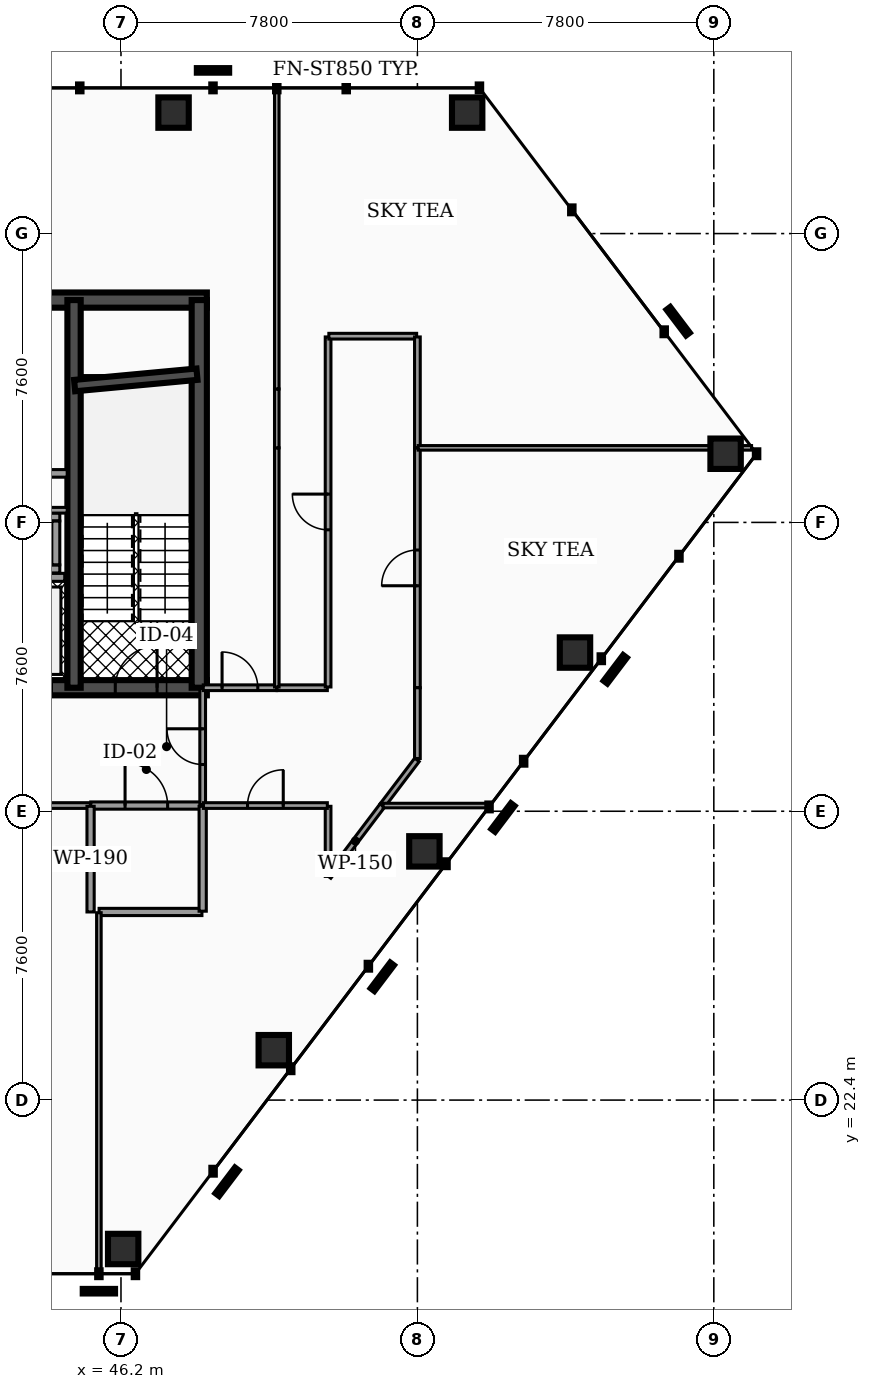
"""IFC4 building model, lengths in metres.
Left out: names, types, materials, properties, quantities, classifications, styles, units other than length and angle.
Written with IfcOpenShell. Run it as: python <this file> out.ifc"""

import sys

from ifc_helpers import new_model, si_unit, direction, frame, frame_2d, origin, origin_2d, place, context, subcontext, project, spatial, rectangle, hollow_rectangle, extrude, element, fill, save


model = new_model("IFC4")
c1 = context("Model", 3, precision=1e-05, world=origin(), true_north=direction((0.0, 1.0)))
c2 = subcontext(c1, "Body", "Model", "MODEL_VIEW")
j1 = project(units=[si_unit("LENGTHUNIT", "METRE"), si_unit("PLANEANGLEUNIT", "RADIAN")], contexts=[c1])
p1 = place(None, origin())
s1 = spatial("IfcSite", under=j1, at=p1, CompositionType="ELEMENT")
p2 = place(p1, origin())
s2 = spatial("IfcBuilding", under=s1, at=p2, CompositionType="ELEMENT")
p3 = place(p2, frame((0.0, 0.0, 145.86)))
s3 = spatial("IfcBuildingStorey", under=s2, at=p3, CompositionType="ELEMENT", Elevation=145.86)
p4 = place(p3, frame((28.4, 43.45, 0.0), z_axis=(0.0, 0.0, 1.0), x_axis=(1.0, 0.0, 0.0)))
e1 = element("IfcWall", 1, at=p4, inside=s3, PredefinedType="SHEAR", context=c2, shape_type="SweptSolid", body=[
    extrude(rectangle(XDim=20.06, YDim=0.4, at=frame_2d((10.03, 0.0))), origin(), (0.0, 0.0, 1.0), 3.5),
])
p5 = place(p3, frame((28.4, 33.25, 0.0), z_axis=(0.0, 0.0, 1.0), x_axis=(1.0, 0.0, 0.0)))
e2 = element("IfcWall", 2, at=p5, inside=s3, PredefinedType="SHEAR", context=c2, shape_type="SweptSolid", body=[
    extrude(rectangle(XDim=20.06, YDim=0.4, at=frame_2d((10.03, 0.0))), origin(), (0.0, 0.0, 1.0), 3.5),
])
p6 = place(p5, frame((4.03, 0.0, 0.0)))
e3 = element("IfcOpeningElement", 3, at=p6, cuts=e2, PredefinedType="OPENING", context=c2, shape_type="SweptSolid", body=[
    extrude(rectangle(XDim=1.1, YDim=2.15, at=frame_2d((0.55, 1.075))), frame((0.0, 0.21, 0.0), z_axis=(0.0, -1.0, 0.0), x_axis=(1.0, 0.0, 0.0)), (0.0, 0.0, 1.0), 0.42),
])
p7 = place(p5, frame((14.87, 0.0, 0.0)))
e4 = element("IfcOpeningElement", 4, at=p7, cuts=e2, PredefinedType="OPENING", context=c2, shape_type="SweptSolid", body=[
    extrude(rectangle(XDim=1.1, YDim=2.15, at=frame_2d((0.55, 1.075))), frame((0.0, 0.21, 0.0), z_axis=(0.0, -1.0, 0.0), x_axis=(1.0, 0.0, 0.0)), (0.0, 0.0, 1.0), 0.42),
])
p8 = place(p5, frame((5.95, 0.0, 0.0)))
e5 = element("IfcOpeningElement", 5, at=p8, cuts=e2, PredefinedType="OPENING", context=c2, shape_type="SweptSolid", body=[
    extrude(rectangle(XDim=1.0, YDim=2.1, at=frame_2d((0.5, 1.05))), frame((0.0, 0.21, 0.0), z_axis=(0.0, -1.0, 0.0), x_axis=(1.0, 0.0, 0.0)), (0.0, 0.0, 1.0), 0.42),
])
p9 = place(p5, frame((7.65, 0.0, 0.0)))
e6 = element("IfcOpeningElement", 6, at=p9, cuts=e2, PredefinedType="OPENING", context=c2, shape_type="SweptSolid", body=[
    extrude(rectangle(XDim=1.0, YDim=2.1, at=frame_2d((0.5, 1.05))), frame((0.0, 0.21, 0.0), z_axis=(0.0, -1.0, 0.0), x_axis=(1.0, 0.0, 0.0)), (0.0, 0.0, 1.0), 0.42),
])
p10 = place(p5, frame((1.31, 0.0, 0.0)))
e7 = element("IfcOpeningElement", 7, at=p10, cuts=e2, PredefinedType="OPENING", context=c2, shape_type="SweptSolid", body=[
    extrude(rectangle(XDim=1.1, YDim=2.2, at=frame_2d((0.55, 1.1))), frame((0.0, 0.21, 0.0), z_axis=(0.0, -1.0, 0.0), x_axis=(1.0, 0.0, 0.0)), (0.0, 0.0, 1.0), 0.42),
])
p11 = place(p5, frame((9.44, 0.0, 0.0)))
e8 = element("IfcOpeningElement", 8, at=p11, cuts=e2, PredefinedType="OPENING", context=c2, shape_type="SweptSolid", body=[
    extrude(rectangle(XDim=1.12, YDim=2.05, at=frame_2d((0.56, 1.025))), frame((0.0, 0.21, 0.0), z_axis=(0.0, -1.0, 0.0), x_axis=(1.0, 0.0, 0.0)), (0.0, 0.0, 1.0), 0.42),
])
p12 = place(p5, frame((17.65, 0.0, 0.0)))
e9 = element("IfcOpeningElement", 9, at=p12, cuts=e2, PredefinedType="OPENING", context=c2, shape_type="SweptSolid", body=[
    extrude(rectangle(XDim=1.1, YDim=2.2, at=frame_2d((0.55, 1.1))), frame((0.0, 0.21, 0.0), z_axis=(0.0, -1.0, 0.0), x_axis=(1.0, 0.0, 0.0)), (0.0, 0.0, 1.0), 0.42),
])
p13 = place(p3, frame((44.965, 33.25, 0.0), z_axis=(0.0, 0.0, 1.0), x_axis=(0.0, 1.0, 0.0)))
e10 = element("IfcWall", 10, at=p13, inside=s3, PredefinedType="SHEAR", context=c2, shape_type="SweptSolid", body=[
    extrude(rectangle(XDim=10.2, YDim=0.35, at=frame_2d((5.1, 0.0))), origin(), (0.0, 0.0, 1.0), 3.5),
])
p14 = place(p3, frame((48.26, 33.25, 0.0), z_axis=(0.0, 0.0, 1.0), x_axis=(0.0, 1.0, 0.0)))
e11 = element("IfcWall", 11, at=p14, inside=s3, PredefinedType="SHEAR", context=c2, shape_type="SweptSolid", body=[
    extrude(rectangle(XDim=10.2, YDim=0.4, at=frame_2d((5.1, 0.0))), origin(), (0.0, 0.0, 1.0), 3.5),
])
p15 = place(p3, frame((44.98, 41.2, 0.0), z_axis=(0.0, 0.0, 1.0), x_axis=(0.995686468965, 0.09278176286, 0.0)))
e12 = element("IfcWall", 12, at=p15, inside=s3, PredefinedType="SHEAR", context=c2, shape_type="SweptSolid", body=[
    extrude(rectangle(XDim=3.234, YDim=0.3, at=frame_2d((1.617, 0.0))), origin(), (0.0, 0.0, 1.0), 3.5),
])
for number, where, z_axis, x_axis in (
    (13, (55.31, 48.383, 0.0), (0.0, 0.0, 1.0), (1.0, 0.0, 0.0)),
    (14, (47.583, 48.383, 0.0), (0.0, 0.0, 1.0), (1.0, 0.0, 0.0)),
    (15, (46.258, 18.481, 0.0), (0.0, 0.0, 1.0), (1.0, 0.0, 0.0)),
    (16, (50.221, 23.713, 0.0), (0.0, 0.0, 1.0), (1.0, 0.0, 0.0)),
    (17, (54.184, 28.944, 0.0), (0.0, 0.0, 1.0), (1.0, 0.0, 0.0)),
    (18, (58.147, 34.176, 0.0), (0.0, 0.0, 1.0), (1.0, 0.0, 0.0)),
    (19, (62.11, 39.407, 0.0), (0.0, 0.0, 1.0), (1.0, 0.0, 0.0)),
):
    element("IfcColumn", number, at=place(p3, frame(where, z_axis=z_axis, x_axis=x_axis)), inside=s3, PredefinedType="COLUMN", context=c2, shape_type="SweptSolid", body=[
        extrude(hollow_rectangle(XDim=0.8, YDim=0.8, WallThickness=0.04, at=origin_2d()), origin(), (0.0, 0.0, 1.0), 3.5),
    ])
p16 = place(p3, frame((42.92, 36.155, 0.0), z_axis=(0.0, 0.0, 1.0), x_axis=(1.0, 0.0, 0.0)))
e20 = element("IfcWall", 20, at=p16, inside=s3, PredefinedType="SOLIDWALL", context=c2, shape_type="SweptSolid", body=[
    extrude(rectangle(XDim=1.8, YDim=0.21, at=frame_2d((0.9, 0.0))), origin(), (0.0, 0.0, 1.0), 2.472),
])
for number, where, z_axis, x_axis in (
    (21, (42.99, 36.375, 0.0), (0.0, 0.0, 1.0), (1.0, 0.0, 0.0)),
    (22, (42.99, 37.745, 0.0), (0.0, 0.0, 1.0), (1.0, 0.0, 0.0)),
):
    element("IfcWall", number, at=place(p3, frame(where, z_axis=z_axis, x_axis=x_axis)), inside=s3, PredefinedType="SOLIDWALL", context=c2, shape_type="SweptSolid", body=[
        extrude(rectangle(XDim=1.6, YDim=0.21, at=frame_2d((0.8, 0.0))), origin(), (0.0, 0.0, 1.0), 3.5),
    ])
p17 = place(p3, frame((44.485, 36.485, 0.0), z_axis=(0.0, 0.0, 1.0), x_axis=(0.0, 1.0, 0.0)))
e23 = element("IfcWall", 23, at=p17, inside=s3, PredefinedType="SOLIDWALL", context=c2, shape_type="SweptSolid", body=[
    extrude(rectangle(XDim=1.15, YDim=0.21, at=frame_2d((0.575, 0.0))), origin(), (0.0, 0.0, 1.0), 3.5),
])
p18 = place(p3, frame((39.25, 38.89, 0.0), z_axis=(0.0, 0.0, 1.0), x_axis=(1.0, 0.0, 0.0)))
e24 = element("IfcWall", 24, at=p18, inside=s3, PredefinedType="PARTITIONING", context=c2, shape_type="SweptSolid", body=[
    extrude(rectangle(XDim=5.535, YDim=0.2, at=frame_2d((2.768, 0.0))), origin(), (0.0, 0.0, 1.0), 2.457),
])
p19 = place(p18, frame((2.327, 0.0, 0.0)))
e25 = element("IfcOpeningElement", 25, at=p19, cuts=e24, PredefinedType="OPENING", context=c2, shape_type="SweptSolid", body=[
    extrude(rectangle(XDim=0.88, YDim=2.05, at=frame_2d((0.44, 1.025))), frame((0.0, 0.11, 0.0), z_axis=(0.0, -1.0, 0.0), x_axis=(1.0, 0.0, 0.0)), (0.0, 0.0, 1.0), 0.22),
])
p20 = place(p3, frame((41.62, 37.92, 0.0), z_axis=(0.0, 0.0, 1.0), x_axis=(1.0, 0.0, 0.0)))
e26 = element("IfcWall", 26, at=p20, inside=s3, PredefinedType="PARTITIONING", context=c2, shape_type="SweptSolid", body=[
    extrude(rectangle(XDim=3.165, YDim=0.15, at=frame_2d((1.583, 0.0))), origin(), (0.0, 0.0, 1.0), 2.457),
])
p21 = place(p20, frame((0.312, 0.0, 0.0)))
e27 = element("IfcOpeningElement", 27, at=p21, cuts=e26, PredefinedType="OPENING", context=c2, shape_type="SweptSolid", body=[
    extrude(rectangle(XDim=0.94, YDim=2.05, at=frame_2d((0.47, 1.025))), frame((0.0, 0.085, 0.0), z_axis=(0.0, -1.0, 0.0), x_axis=(1.0, 0.0, 0.0)), (0.0, 0.0, 1.0), 0.17),
])
p22 = place(p3, frame((45.405, 30.15, 0.0), z_axis=(0.0, 0.0, 1.0), x_axis=(1.0, 0.0, 0.0)))
e28 = element("IfcWall", 28, at=p22, inside=s3, PredefinedType="PARTITIONING", context=c2, shape_type="SweptSolid", body=[
    extrude(rectangle(XDim=2.925, YDim=0.19, at=frame_2d((1.462, 0.0))), origin(), (0.0, 0.0, 1.0), 2.457),
])
p23 = place(p22, frame((0.903, 0.0, 0.0)))
e29 = element("IfcOpeningElement", 29, at=p23, cuts=e28, PredefinedType="OPENING", context=c2, shape_type="SweptSolid", body=[
    extrude(rectangle(XDim=1.12, YDim=2.05, at=frame_2d((0.56, 1.025))), frame((0.0, 0.105, 0.0), z_axis=(0.0, -1.0, 0.0), x_axis=(1.0, 0.0, 0.0)), (0.0, 0.0, 1.0), 0.21),
])
p24 = place(p3, frame((48.35, 30.17, 0.0), z_axis=(0.0, 0.0, 1.0), x_axis=(0.0, 1.0, 0.0)))
e30 = element("IfcWall", 30, at=p24, inside=s3, PredefinedType="PARTITIONING", context=c2, shape_type="SweptSolid", body=[
    extrude(rectangle(XDim=3.06, YDim=0.15, at=frame_2d((1.53, 0.0))), origin(), (0.0, 0.0, 1.0), 2.457),
])
p25 = place(p24, frame((1.06, 0.0, 0.0)))
e31 = element("IfcOpeningElement", 31, at=p25, cuts=e30, PredefinedType="OPENING", context=c2, shape_type="SweptSolid", body=[
    extrude(rectangle(XDim=0.94, YDim=2.05, at=frame_2d((0.47, 1.025))), frame((0.0, 0.085, 0.0), z_axis=(0.0, -1.0, 0.0), x_axis=(1.0, 0.0, 0.0)), (0.0, 0.0, 1.0), 0.17),
])
p26 = place(p3, frame((35.385, 30.15, 0.0), z_axis=(0.0, 0.0, 1.0), x_axis=(1.0, 0.0, 0.0)))
e32 = element("IfcWall", 32, at=p26, inside=s3, PredefinedType="PARTITIONING", context=c2, shape_type="SweptSolid", body=[
    extrude(rectangle(XDim=10.01, YDim=0.15, at=frame_2d((5.005, 0.0))), origin(), (0.0, 0.0, 1.0), 2.457),
])
p27 = place(p26, frame((7.935, 0.0, 0.0)))
e33 = element("IfcOpeningElement", 33, at=p27, cuts=e32, PredefinedType="OPENING", context=c2, shape_type="SweptSolid", body=[
    extrude(rectangle(XDim=0.94, YDim=2.05, at=frame_2d((0.47, 1.025))), frame((0.0, 0.085, 0.0), z_axis=(0.0, -1.0, 0.0), x_axis=(1.0, 0.0, 0.0)), (0.0, 0.0, 1.0), 0.17),
])
p28 = place(p3, frame((45.4, 27.35, 0.0), z_axis=(0.0, 0.0, 1.0), x_axis=(0.0, 1.0, 0.0)))
e34 = element("IfcWall", 34, at=p28, inside=s3, PredefinedType="PARTITIONING", context=c2, shape_type="SweptSolid", body=[
    extrude(rectangle(XDim=2.78, YDim=0.19, at=frame_2d((1.39, 0.0))), origin(), (0.0, 0.0, 1.0), 2.457),
])
p29 = place(p3, frame((45.624, 27.35, 0.0), z_axis=(0.0, 0.0, 1.0), x_axis=(1.0, 0.0, 0.0)))
e35 = element("IfcWall", 35, at=p29, inside=s3, PredefinedType="PARTITIONING", context=c2, shape_type="SweptSolid", body=[
    extrude(rectangle(XDim=2.706, YDim=0.19, at=frame_2d((1.353, 0.0))), origin(), (0.0, 0.0, 1.0), 2.457),
])
p30 = place(p3, frame((48.35, 27.37, 0.0), z_axis=(0.0, 0.0, 1.0), x_axis=(0.0, 1.0, 0.0)))
e36 = element("IfcWall", 36, at=p30, inside=s3, PredefinedType="PARTITIONING", context=c2, shape_type="SweptSolid", body=[
    extrude(rectangle(XDim=2.76, YDim=0.19, at=frame_2d((1.38, 0.0))), origin(), (0.0, 0.0, 1.0), 2.457),
])
p31 = place(p3, frame((51.662, 28.282, 0.0), z_axis=(0.0, 0.0, 1.0), x_axis=(0.603811538878, 0.797127107504, 0.0)))
e37 = element("IfcWall", 37, at=p31, inside=s3, PredefinedType="PARTITIONING", context=c2, shape_type="SweptSolid", body=[
    extrude(rectangle(XDim=2.343, YDim=0.15, at=frame_2d((1.171, 0.0))), origin(), (0.0, 0.0, 1.0), 2.457),
])
p32 = place(p3, frame((51.65, 28.286, 0.0), z_axis=(0.0, 0.0, 1.0), x_axis=(0.0, 1.0, 0.0)))
e38 = element("IfcWall", 38, at=p32, inside=s3, PredefinedType="PARTITIONING", context=c2, shape_type="SweptSolid", body=[
    extrude(rectangle(XDim=1.844, YDim=0.15, at=frame_2d((0.922, 0.0))), origin(), (0.0, 0.0, 1.0), 2.457),
])
p33 = place(p3, frame((48.37, 30.15, 0.0), z_axis=(0.0, 0.0, 1.0), x_axis=(1.0, 0.0, 0.0)))
e39 = element("IfcWall", 39, at=p33, inside=s3, PredefinedType="PARTITIONING", context=c2, shape_type="SweptSolid", body=[
    extrude(rectangle(XDim=3.26, YDim=0.15, at=frame_2d((1.63, 0.0))), origin(), (0.0, 0.0, 1.0), 2.457),
])
p34 = place(p33, frame((1.16, 0.0, 0.0)))
e40 = element("IfcOpeningElement", 40, at=p34, cuts=e39, PredefinedType="OPENING", context=c2, shape_type="SweptSolid", body=[
    extrude(rectangle(XDim=0.94, YDim=2.05, at=frame_2d((0.47, 1.025))), frame((0.0, 0.085, 0.0), z_axis=(0.0, -1.0, 0.0), x_axis=(1.0, 0.0, 0.0)), (0.0, 0.0, 1.0), 0.17),
])
p35 = place(p3, frame((54.0, 33.25, 0.0), z_axis=(0.0, 0.0, 1.0), x_axis=(0.0, 1.0, 0.0)))
e41 = element("IfcWall", 41, at=p35, inside=s3, PredefinedType="PARTITIONING", context=c2, shape_type="SweptSolid", body=[
    extrude(rectangle(XDim=6.307, YDim=0.15, at=frame_2d((3.153, 0.0))), origin(), (0.0, 0.0, 1.0), 2.457),
])
p36 = place(p35, frame((2.683, 0.0, 0.0)))
e42 = element("IfcOpeningElement", 42, at=p36, cuts=e41, PredefinedType="OPENING", context=c2, shape_type="SweptSolid", body=[
    extrude(rectangle(XDim=0.94, YDim=2.05, at=frame_2d((0.47, 1.025))), frame((0.0, 0.085, 0.0), z_axis=(0.0, -1.0, 0.0), x_axis=(1.0, 0.0, 0.0)), (0.0, 0.0, 1.0), 0.17),
])
p37 = place(p3, frame((54.0, 31.388, 0.0), z_axis=(0.0, 0.0, 1.0), x_axis=(0.0, 1.0, 0.0)))
e43 = element("IfcWall", 43, at=p37, inside=s3, PredefinedType="PARTITIONING", context=c2, shape_type="SweptSolid", body=[
    extrude(rectangle(XDim=1.862, YDim=0.15, at=frame_2d((0.931, 0.0))), origin(), (0.0, 0.0, 1.0), 2.457),
])
p38 = place(p3, frame((53.08, 30.154, 0.0), z_axis=(0.0, 0.0, 1.0), x_axis=(0.603892095683, 0.797066080555, 0.0)))
e44 = element("IfcWall", 44, at=p38, inside=s3, PredefinedType="PARTITIONING", context=c2, shape_type="SweptSolid", body=[
    extrude(rectangle(XDim=1.503, YDim=0.15, at=frame_2d((0.751, 0.0))), origin(), (0.0, 0.0, 1.0), 2.457),
])
p39 = place(p3, frame((50.305, 33.25, 0.0), z_axis=(0.0, 0.0, 1.0), x_axis=(1.0, 0.0, 0.0)))
e45 = element("IfcWall", 45, at=p39, inside=s3, PredefinedType="PARTITIONING", context=c2, shape_type="SweptSolid", body=[
    extrude(rectangle(XDim=1.325, YDim=0.15, at=frame_2d((0.663, 0.0))), origin(), (0.0, 0.0, 1.0), 2.457),
])
p40 = place(p3, frame((51.65, 33.27, 0.0), z_axis=(0.0, 0.0, 1.0), x_axis=(0.0, 1.0, 0.0)))
e46 = element("IfcWall", 46, at=p40, inside=s3, PredefinedType="PARTITIONING", context=c2, shape_type="SweptSolid", body=[
    extrude(rectangle(XDim=9.21, YDim=0.15, at=frame_2d((4.605, 0.0))), origin(), (0.0, 0.0, 1.0), 2.457),
])
p41 = place(p40, frame((4.135, 0.0, 0.0)))
e47 = element("IfcOpeningElement", 47, at=p41, cuts=e46, PredefinedType="OPENING", context=c2, shape_type="SweptSolid", body=[
    extrude(rectangle(XDim=0.94, YDim=2.05, at=frame_2d((0.47, 1.025))), frame((0.0, 0.085, 0.0), z_axis=(0.0, -1.0, 0.0), x_axis=(1.0, 0.0, 0.0)), (0.0, 0.0, 1.0), 0.17),
])
p42 = place(p3, frame((51.67, 42.5, 0.0), z_axis=(0.0, 0.0, 1.0), x_axis=(1.0, 0.0, 0.0)))
e48 = element("IfcWall", 48, at=p42, inside=s3, PredefinedType="PARTITIONING", context=c2, shape_type="SweptSolid", body=[
    extrude(rectangle(XDim=2.31, YDim=0.15, at=frame_2d((1.155, 0.0))), origin(), (0.0, 0.0, 1.0), 2.457),
])
p43 = place(p3, frame((54.0, 39.567, 0.0), z_axis=(0.0, 0.0, 1.0), x_axis=(0.0, 1.0, 0.0)))
e49 = element("IfcWall", 49, at=p43, inside=s3, PredefinedType="PARTITIONING", context=c2, shape_type="SweptSolid", body=[
    extrude(rectangle(XDim=2.913, YDim=0.15, at=frame_2d((1.457, 0.0))), origin(), (0.0, 0.0, 1.0), 2.457),
])
p44 = place(p3, frame((48.365, 33.25, 0.0), z_axis=(0.0, 0.0, 1.0), x_axis=(1.0, 0.0, 0.0)))
e50 = element("IfcWall", 50, at=p44, inside=s3, PredefinedType="PARTITIONING", context=c2, shape_type="SweptSolid", body=[
    extrude(rectangle(XDim=1.93, YDim=0.15, at=frame_2d((0.965, 0.0))), origin(), (0.0, 0.0, 1.0), 2.457),
])
p45 = place(p44, frame((0.495, 0.0, 0.0)))
e51 = element("IfcOpeningElement", 51, at=p45, cuts=e50, PredefinedType="OPENING", context=c2, shape_type="SweptSolid", body=[
    extrude(rectangle(XDim=0.94, YDim=2.05, at=frame_2d((0.47, 1.025))), frame((0.0, 0.085, 0.0), z_axis=(0.0, -1.0, 0.0), x_axis=(1.0, 0.0, 0.0)), (0.0, 0.0, 1.0), 0.17),
])
p46 = place(p3, frame((45.619, 17.846, 0.0), z_axis=(0.0, 0.0, 1.0), x_axis=(0.0, 1.0, 0.0)))
e52 = element("IfcWall", 52, at=p46, inside=s3, PredefinedType="PARTITIONING", context=c2, shape_type="SweptSolid", body=[
    extrude(rectangle(XDim=9.484, YDim=0.12, at=frame_2d((4.742, 0.0))), origin(), (0.0, 0.0, 1.0), 2.457),
])
p47 = place(p3, frame((53.097, 30.15, 0.0), z_axis=(0.0, 0.0, 1.0), x_axis=(1.0, 0.0, 0.0)))
e53 = element("IfcWall", 53, at=p47, inside=s3, PredefinedType="PARTITIONING", context=c2, shape_type="SweptSolid", body=[
    extrude(rectangle(XDim=2.8, YDim=0.12, at=frame_2d((1.4, 0.0))), origin(), (0.0, 0.0, 1.0), 2.457),
])
p48 = place(p3, frame((54.02, 39.562, 0.0), z_axis=(0.0, 0.0, 1.0), x_axis=(1.0, 0.0, 0.0)))
e54 = element("IfcWall", 54, at=p48, inside=s3, PredefinedType="PARTITIONING", context=c2, shape_type="SweptSolid", body=[
    extrude(rectangle(XDim=8.773, YDim=0.12, at=frame_2d((4.387, 0.0))), origin(), (0.0, 0.0, 1.0), 2.457),
])
p49 = place(p3, frame((50.3, 33.27, 0.0), z_axis=(0.0, 0.0, 1.0), x_axis=(0.0, 1.0, 0.0)))
e55 = element("IfcWall", 55, at=p49, inside=s3, PredefinedType="PARTITIONING", context=c2, shape_type="SweptSolid", body=[
    extrude(rectangle(XDim=6.292, YDim=0.12, at=frame_2d((3.146, 0.0))), origin(), (0.0, 0.0, 1.0), 2.457),
])
p50 = place(p3, frame((50.3, 39.562, 0.0), z_axis=(0.0, 0.0, 1.0), x_axis=(0.0, 1.0, 0.0)))
e56 = element("IfcWall", 56, at=p50, inside=s3, PredefinedType="PARTITIONING", context=c2, shape_type="SweptSolid", body=[
    extrude(rectangle(XDim=1.55, YDim=0.12, at=frame_2d((0.775, 0.0))), origin(), (0.0, 0.0, 1.0), 2.457),
])
p51 = place(p3, frame((50.3, 41.112, 0.0), z_axis=(0.0, 0.0, 1.0), x_axis=(0.0, 1.0, 0.0)))
e57 = element("IfcWall", 57, at=p51, inside=s3, PredefinedType="PARTITIONING", context=c2, shape_type="SweptSolid", body=[
    extrude(rectangle(XDim=7.907, YDim=0.12, at=frame_2d((3.953, 0.0))), origin(), (0.0, 0.0, 1.0), 2.457),
])
p52 = place(p12, origin())
e58 = element("IfcDoor", 58, at=p52, inside=s3, OperationType="SINGLE_SWING_RIGHT", PredefinedType="DOOR", context=c2, shape_type="SweptSolid", body=[
    extrude(rectangle(XDim=1.1, YDim=2.2, at=frame_2d((0.55, 1.1))), frame((0.0, 0.025, 0.0), z_axis=(0.0, -1.0, 0.0), x_axis=(1.0, 0.0, 0.0)), (0.0, 0.0, 1.0), 0.05),
])
fill(e9, e58)
p53 = place(p23, origin())
e59 = element("IfcDoor", 59, at=p53, inside=s3, OperationType="SINGLE_SWING_LEFT", PredefinedType="DOOR", context=c2, shape_type="SweptSolid", body=[
    extrude(rectangle(XDim=1.12, YDim=2.05, at=frame_2d((0.56, 1.025))), frame((0.0, 0.025, 0.0), z_axis=(0.0, -1.0, 0.0), x_axis=(1.0, 0.0, 0.0)), (0.0, 0.0, 1.0), 0.05),
])
fill(e29, e59)
p54 = place(p25, origin())
e60 = element("IfcDoor", 60, at=p54, inside=s3, OperationType="SINGLE_SWING_RIGHT", PredefinedType="DOOR", context=c2, shape_type="SweptSolid", body=[
    extrude(rectangle(XDim=0.94, YDim=2.05, at=frame_2d((0.47, 1.025))), frame((0.0, 0.025, 0.0), z_axis=(0.0, -1.0, 0.0), x_axis=(1.0, 0.0, 0.0)), (0.0, 0.0, 1.0), 0.05),
])
fill(e31, e60)
p55 = place(p34, origin())
e61 = element("IfcDoor", 61, at=p55, inside=s3, OperationType="SINGLE_SWING_RIGHT", PredefinedType="DOOR", context=c2, shape_type="SweptSolid", body=[
    extrude(rectangle(XDim=0.94, YDim=2.05, at=frame_2d((0.47, 1.025))), frame((0.0, 0.025, 0.0), z_axis=(0.0, -1.0, 0.0), x_axis=(1.0, 0.0, 0.0)), (0.0, 0.0, 1.0), 0.05),
])
fill(e40, e61)
p56 = place(p36, origin())
e62 = element("IfcDoor", 62, at=p56, inside=s3, OperationType="SINGLE_SWING_LEFT", PredefinedType="DOOR", context=c2, shape_type="SweptSolid", body=[
    extrude(rectangle(XDim=0.94, YDim=2.05, at=frame_2d((0.47, 1.025))), frame((0.0, 0.025, 0.0), z_axis=(0.0, -1.0, 0.0), x_axis=(1.0, 0.0, 0.0)), (0.0, 0.0, 1.0), 0.05),
])
fill(e42, e62)
p57 = place(p41, origin())
e63 = element("IfcDoor", 63, at=p57, inside=s3, OperationType="SINGLE_SWING_RIGHT", PredefinedType="DOOR", context=c2, shape_type="SweptSolid", body=[
    extrude(rectangle(XDim=0.94, YDim=2.05, at=frame_2d((0.47, 1.025))), frame((0.0, 0.025, 0.0), z_axis=(0.0, -1.0, 0.0), x_axis=(1.0, 0.0, 0.0)), (0.0, 0.0, 1.0), 0.05),
])
fill(e47, e63)
p58 = place(p45, origin())
e64 = element("IfcDoor", 64, at=p58, inside=s3, OperationType="SINGLE_SWING_LEFT", PredefinedType="DOOR", context=c2, shape_type="SweptSolid", body=[
    extrude(rectangle(XDim=0.94, YDim=2.05, at=frame_2d((0.47, 1.025))), frame((0.0, 0.025, 0.0), z_axis=(0.0, -1.0, 0.0), x_axis=(1.0, 0.0, 0.0)), (0.0, 0.0, 1.0), 0.05),
])
fill(e51, e64)
save(model, sys.argv[1])
